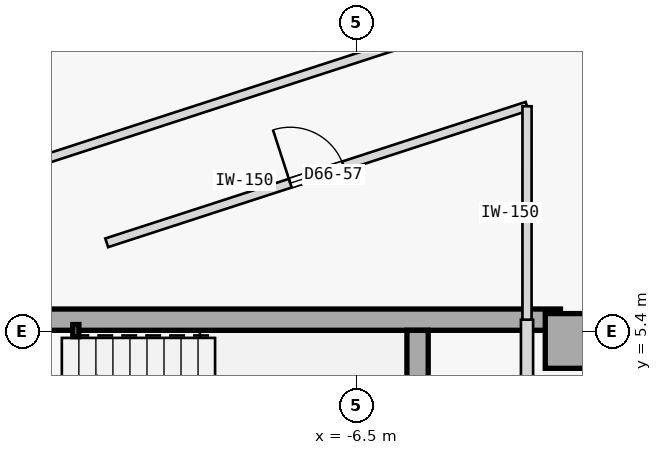
"""IFC4 building model, lengths in metres.
Left out: names, types, materials, properties, quantities, classifications, styles, units other than length and angle.
Written with IfcOpenShell. Run it as: python <this file> out.ifc"""

import sys

from ifc_helpers import new_model, si_unit, direction, frame, frame_2d, origin, origin_2d, place, context, subcontext, project, spatial, rectangle, hollow_rectangle, extrude, element, fill, save


model = new_model("IFC4")
c1 = context("Model", 3, precision=1e-05, world=origin(), true_north=direction((0.0, 1.0)))
c2 = subcontext(c1, "Body", "Model", "MODEL_VIEW")
j1 = project(units=[si_unit("LENGTHUNIT", "METRE"), si_unit("PLANEANGLEUNIT", "RADIAN")], contexts=[c1])
p1 = place(None, origin())
s1 = spatial("IfcSite", under=j1, at=p1, CompositionType="ELEMENT")
p2 = place(p1, origin())
s2 = spatial("IfcBuilding", under=s1, at=p2, CompositionType="ELEMENT")
p3 = place(p2, frame((0.0, 0.0, 247.75)))
s3 = spatial("IfcBuildingStorey", under=s2, at=p3, CompositionType="ELEMENT", Elevation=247.75)
p4 = place(p3, frame((-2.95, 5.25, 0.0), z_axis=(0.0, 0.0, 1.0), x_axis=(1.0, 0.0, 0.0)))
e1 = element("IfcColumn", 1, at=p4, inside=s3, PredefinedType="COLUMN", context=c2, shape_type="SweptSolid", body=[
    extrude(rectangle(XDim=0.9, YDim=0.9, at=origin_2d()), origin(), (0.0, 0.0, 1.0), 3.35),
])
p5 = place(p3, frame((-14.56, 5.6, 0.0), z_axis=(0.0, 0.0, 1.0), x_axis=(1.0, 0.0, 0.0)))
e2 = element("IfcWall", 2, at=p5, inside=s3, PredefinedType="SHEAR", context=c2, shape_type="SweptSolid", body=[
    extrude(rectangle(XDim=11.41, YDim=0.35, at=frame_2d((5.705, 0.0))), origin(), (0.0, 0.0, 1.0), 3.125),
])
p6 = place(p3, frame((-5.5, 2.15, 0.0), z_axis=(0.0, 0.0, 1.0), x_axis=(0.0, 1.0, 0.0)))
e3 = element("IfcWall", 3, at=p6, inside=s3, PredefinedType="SHEAR", context=c2, shape_type="SweptSolid", body=[
    extrude(rectangle(XDim=3.275, YDim=0.35, at=frame_2d((1.638, 0.0))), origin(), (0.0, 0.0, 1.0), 3.125),
])
p7 = place(p3, frame((-11.12, 5.42, 0.0), z_axis=(0.0, 0.0, 1.0), x_axis=(1.0, 0.0, 0.0)))
e4 = element("IfcColumn", 4, at=p7, inside=s3, PredefinedType="COLUMN", context=c2, shape_type="SweptSolid", body=[
    extrude(hollow_rectangle(XDim=0.1, YDim=0.2, WallThickness=0.008, at=origin_2d()), origin(), (0.0, 0.0, 1.0), 3.35),
])
p8 = place(p3, frame((-3.7, -1.15, 0.0), z_axis=(0.0, 0.0, 1.0), x_axis=(0.0, 1.0, 0.0)))
e5 = element("IfcWall", 5, at=p8, inside=s3, PredefinedType="STANDARD", context=c2, shape_type="SweptSolid", body=[
    extrude(rectangle(XDim=6.75, YDim=0.2, at=frame_2d((3.375, 0.0))), origin(), (0.0, 0.0, 1.0), 3.125),
])
p9 = place(p8, frame((1.1, 0.0, 0.0)))
e6 = element("IfcOpeningElement", 6, at=p9, cuts=e5, PredefinedType="OPENING", context=c2, shape_type="SweptSolid", body=[
    extrude(rectangle(XDim=0.9, YDim=2.15, at=frame_2d((0.45, 1.075))), frame((0.0, 0.11, 0.0), z_axis=(0.0, -1.0, 0.0), x_axis=(1.0, 0.0, 0.0)), (0.0, 0.0, 1.0), 0.22),
])
p10 = place(p8, frame((4.0, 0.0, 0.0)))
e7 = element("IfcOpeningElement", 7, at=p10, cuts=e5, PredefinedType="OPENING", context=c2, shape_type="SweptSolid", body=[
    extrude(rectangle(XDim=0.92, YDim=2.15, at=frame_2d((0.46, 1.075))), frame((0.0, 0.11, 0.0), z_axis=(0.0, -1.0, 0.0), x_axis=(1.0, 0.0, 0.0)), (0.0, 0.0, 1.0), 0.22),
])
p11 = place(p3, frame((-19.497, 5.68, 0.0), z_axis=(0.0, 0.0, 1.0), x_axis=(0.95105300492, 0.309027801067, 0.0)))
e8 = element("IfcWall", 8, at=p11, inside=s3, PredefinedType="PARTITIONING", context=c2, shape_type="SweptSolid", body=[
    extrude(rectangle(XDim=14.779, YDim=0.15, at=frame_2d((7.39, 0.0))), origin(), (0.0, 0.0, 1.0), 3.125),
])
p12 = place(p11, frame((6.915, 0.0, 0.0)))
e9 = element("IfcOpeningElement", 9, at=p12, cuts=e8, PredefinedType="OPENING", context=c2, shape_type="SweptSolid", body=[
    extrude(rectangle(XDim=0.95, YDim=2.15, at=frame_2d((0.475, 1.075))), frame((0.0, 0.085, 0.0), z_axis=(0.0, -1.0, 0.0), x_axis=(1.0, 0.0, 0.0)), (0.0, 0.0, 1.0), 0.17),
])
p13 = place(p3, frame((-10.612, 6.864, 0.0), z_axis=(0.0, 0.0, 1.0), x_axis=(0.951060972078, 0.309003280548, 0.0)))
e10 = element("IfcWall", 10, at=p13, inside=s3, PredefinedType="PARTITIONING", context=c2, shape_type="SweptSolid", body=[
    extrude(rectangle(XDim=7.268, YDim=0.15, at=frame_2d((3.634, 0.0))), origin(), (0.0, 0.0, 1.0), 3.125),
])
p14 = place(p13, frame((3.174, 0.0, 0.0)))
e11 = element("IfcOpeningElement", 11, at=p14, cuts=e10, PredefinedType="OPENING", context=c2, shape_type="SweptSolid", body=[
    extrude(rectangle(XDim=0.92, YDim=2.15, at=frame_2d((0.46, 1.075))), frame((0.0, 0.085, 0.0), z_axis=(0.0, -1.0, 0.0), x_axis=(1.0, 0.0, 0.0)), (0.0, 0.0, 1.0), 0.17),
])
p15 = place(p3, frame((-3.7, 5.6, 0.0), z_axis=(0.0, 0.0, 1.0), x_axis=(0.000139120755, 0.999999990323, 0.0)))
e12 = element("IfcWall", 12, at=p15, inside=s3, PredefinedType="PARTITIONING", context=c2, shape_type="SweptSolid", body=[
    extrude(rectangle(XDim=3.51, YDim=0.15, at=frame_2d((1.755, 0.0))), origin(), (0.0, 0.0, 1.0), 3.125),
])
p16 = place(p14, origin())
e13 = element("IfcDoor", 13, at=p16, inside=s3, OperationType="SINGLE_SWING_LEFT", PredefinedType="DOOR", context=c2, shape_type="SweptSolid", body=[
    extrude(rectangle(XDim=0.92, YDim=2.15, at=frame_2d((0.46, 1.075))), frame((0.0, 0.025, 0.0), z_axis=(0.0, -1.0, 0.0), x_axis=(1.0, 0.0, 0.0)), (0.0, 0.0, 1.0), 0.05),
])
fill(e11, e13)
save(model, sys.argv[1])
